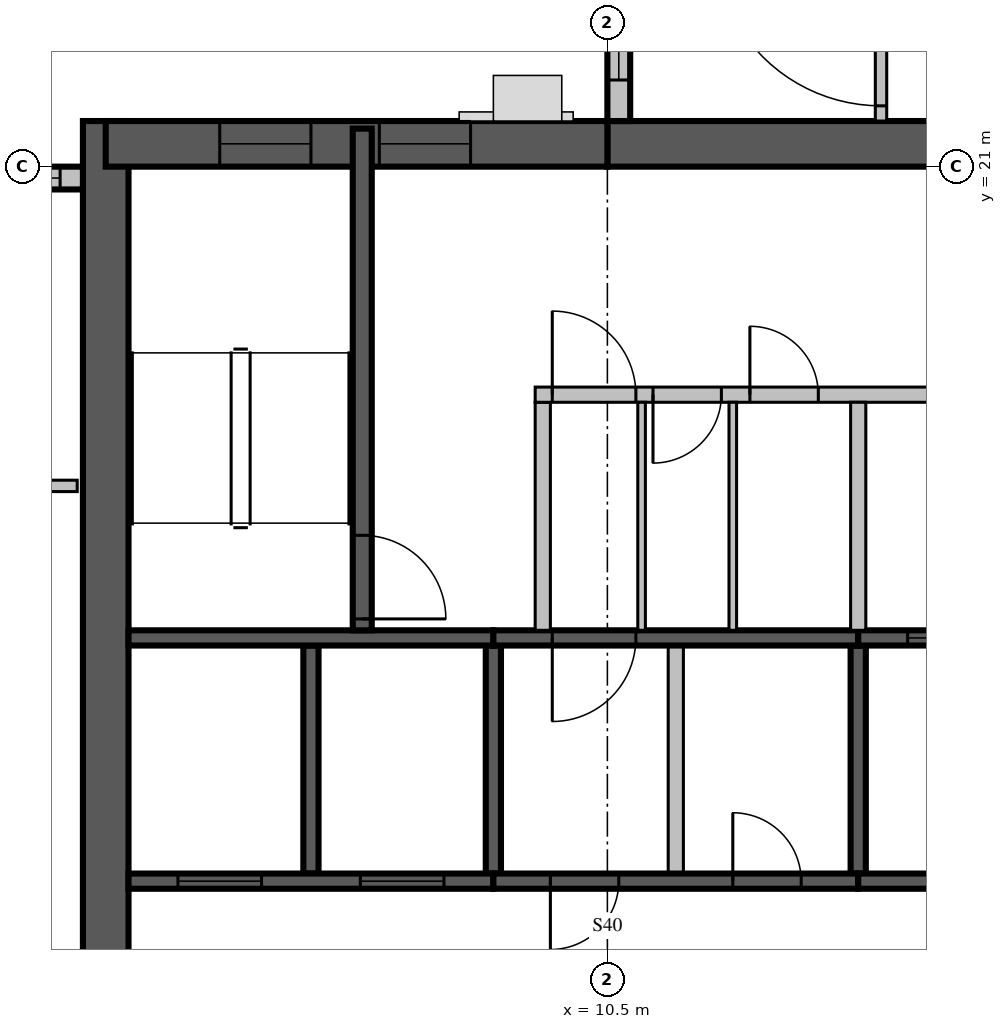
"""IFC4 building model, lengths in metres.
Left out: names, types, materials, properties, quantities, classifications, styles, units other than length and angle.
Written with IfcOpenShell. Run it as: python <this file> out.ifc"""

import sys

from ifc_helpers import new_model, si_unit, direction, frame, frame_2d, origin, place, context, subcontext, project, spatial, rectangle, extrude, source, transform, mapped, element, fill, save


model = new_model("IFC4")
c1 = context("Model", 3, precision=1e-05, world=origin(), true_north=direction((0.0, 1.0)))
c2 = subcontext(c1, "Body", "Model", "MODEL_VIEW")
j1 = project(units=[si_unit("LENGTHUNIT", "METRE"), si_unit("PLANEANGLEUNIT", "RADIAN")], contexts=[c1])
p1 = place(None, origin())
s1 = spatial("IfcSite", under=j1, at=p1, CompositionType="ELEMENT")
p2 = place(p1, origin())
s2 = spatial("IfcBuilding", under=s1, at=p2, CompositionType="ELEMENT")
p3 = place(p2, frame((0.0, 0.0, 333.5)))
s3 = spatial("IfcBuildingStorey", under=s2, at=p3, CompositionType="ELEMENT", Elevation=333.5)
m1 = source(origin(), c2, "Body", "SweptSolid", [
    extrude(rectangle(XDim=17.4, YDim=0.6, at=frame_2d((8.7, 0.0))), origin(), (0.0, 0.0, 1.0), 3.5),
])
p4 = place(p3, frame((3.9, 4.2, 0.0), z_axis=(0.0, 0.0, 1.0), x_axis=(0.0, 1.0, 0.0)))
e1 = element("IfcWall", 1, at=p4, inside=s3, PredefinedType="SHEAR", context=c2, shape_type="MappedRepresentation", body=[
    mapped(m1, transform((0.0, 0.0, 0.0), scale=1.0)),
])
m2 = source(origin(), c2, "Body", "SweptSolid", [
    extrude(rectangle(XDim=2.2, YDim=2.1, at=frame_2d((1.1, 1.05))), frame((0.0, 0.31, 0.0), z_axis=(0.0, -1.0, 0.0), x_axis=(1.0, 0.0, 0.0)), (0.0, 0.0, 1.0), 0.62),
])
p5 = place(p4, frame((4.2, 0.0, 0.0)))
e2 = element("IfcOpeningElement", 2, at=p5, cuts=e1, PredefinedType="OPENING", context=c2, shape_type="MappedRepresentation", body=[
    mapped(m2, transform((0.0, 0.0, 0.0), scale=1.0)),
])
m3 = source(origin(), c2, "Body", "SweptSolid", [
    extrude(rectangle(XDim=11.1, YDim=0.6, at=frame_2d((5.55, 0.0))), origin(), (0.0, 0.0, 1.0), 3.5),
])
p6 = place(p3, frame((10.5, 21.3, 0.0), z_axis=(0.0, 0.0, 1.0), x_axis=(1.0, 0.0, 0.0)))
e3 = element("IfcWall", 3, at=p6, inside=s3, PredefinedType="SHEAR", context=c2, shape_type="MappedRepresentation", body=[
    mapped(m3, transform((0.0, 0.0, 0.0), scale=1.0)),
])
m4 = source(origin(), c2, "Body", "SweptSolid", [
    extrude(rectangle(XDim=1.2, YDim=2.1, at=frame_2d((0.6, 1.05))), frame((0.0, 0.31, 0.0), z_axis=(0.0, -1.0, 0.0), x_axis=(1.0, 0.0, 0.0)), (0.0, 0.0, 1.0), 0.62),
])
p7 = place(p6, frame((8.7, 0.0, 0.0)))
e4 = element("IfcOpeningElement", 4, at=p7, cuts=e3, PredefinedType="OPENING", context=c2, shape_type="MappedRepresentation", body=[
    mapped(m4, transform((0.0, 0.0, 0.0), scale=1.0)),
])
m5 = source(origin(), c2, "Body", "SweptSolid", [
    extrude(rectangle(XDim=6.6, YDim=0.6, at=frame_2d((3.3, 0.0))), origin(), (0.0, 0.0, 1.0), 3.5),
])
p8 = place(p3, frame((3.9, 21.3, 0.0), z_axis=(0.0, 0.0, 1.0), x_axis=(1.0, 0.0, 0.0)))
e5 = element("IfcWall", 5, at=p8, inside=s3, PredefinedType="SHEAR", context=c2, shape_type="MappedRepresentation", body=[
    mapped(m5, transform((0.0, 0.0, 0.0), scale=1.0)),
])
m6 = source(origin(), c2, "Body", "SweptSolid", [
    extrude(rectangle(XDim=1.2, YDim=2.4, at=frame_2d((0.6, 1.2))), frame((0.0, 0.31, 0.0), z_axis=(0.0, -1.0, 0.0), x_axis=(1.0, 0.0, 0.0)), (0.0, 0.0, 1.0), 0.62),
])
p9 = place(p8, frame((1.5, 0.0, 0.6)))
e6 = element("IfcOpeningElement", 6, at=p9, cuts=e5, PredefinedType="OPENING", context=c2, shape_type="MappedRepresentation", body=[
    mapped(m6, transform((0.0, 0.0, 0.0), scale=1.0)),
])
p10 = place(p8, frame((3.6, 0.0, 0.6)))
e7 = element("IfcOpeningElement", 7, at=p10, cuts=e5, PredefinedType="OPENING", context=c2, shape_type="MappedRepresentation", body=[
    mapped(m6, transform((0.0, 0.0, 0.0), scale=1.0)),
])
m7 = source(origin(), c2, "Body", "SweptSolid", [
    extrude(rectangle(XDim=7.5, YDim=0.3, at=frame_2d((3.75, 0.0))), origin(), (0.0, 0.0, 1.0), 3.1),
])
p11 = place(p3, frame((10.65, 29.1, 0.0), z_axis=(0.0, 0.0, 1.0), x_axis=(0.0, -1.0, 0.0)))
e8 = element("IfcWall", 8, at=p11, inside=s3, PredefinedType="STANDARD", context=c2, shape_type="MappedRepresentation", body=[
    mapped(m7, transform((0.0, 0.0, 0.0), scale=1.0)),
])
m8 = source(origin(), c2, "Body", "SweptSolid", [
    extrude(rectangle(XDim=3.6, YDim=2.0, at=frame_2d((1.8, 1.0))), frame((0.0, 0.16, 0.0), z_axis=(0.0, -1.0, 0.0), x_axis=(1.0, 0.0, 0.0)), (0.0, 0.0, 1.0), 0.32),
])
p12 = place(p11, frame((3.36, 0.0, 0.6)))
e9 = element("IfcOpeningElement", 9, at=p12, cuts=e8, PredefinedType="OPENING", context=c2, shape_type="MappedRepresentation", body=[
    mapped(m8, transform((0.0, 0.0, 0.0), scale=1.0)),
])
m9 = source(origin(), c2, "Body", "SweptSolid", [
    extrude(rectangle(XDim=2.4, YDim=2.0, at=frame_2d((1.2, 1.0))), frame((0.0, 0.16, 0.0), z_axis=(0.0, -1.0, 0.0), x_axis=(1.0, 0.0, 0.0)), (0.0, 0.0, 1.0), 0.32),
])
p13 = place(p11, frame((0.48, 0.0, 0.6)))
e10 = element("IfcOpeningElement", 10, at=p13, cuts=e8, PredefinedType="OPENING", context=c2, shape_type="MappedRepresentation", body=[
    mapped(m9, transform((0.0, 0.0, 0.0), scale=1.0)),
])
m10 = source(origin(), c2, "Body", "SweptSolid", [
    extrude(rectangle(XDim=3.0, YDim=0.3, at=frame_2d((1.5, 0.0))), origin(), (0.0, 0.0, 1.0), 3.1),
])
p14 = place(p3, frame((3.6, 20.85, 0.0), z_axis=(0.0, 0.0, 1.0), x_axis=(-1.0, 0.0, 0.0)))
e11 = element("IfcWall", 11, at=p14, inside=s3, PredefinedType="STANDARD", context=c2, shape_type="MappedRepresentation", body=[
    mapped(m10, transform((0.0, 0.0, 0.0), scale=1.0)),
])
p15 = place(p14, frame((0.3, 0.0, 0.6)))
e12 = element("IfcOpeningElement", 12, at=p15, cuts=e11, PredefinedType="OPENING", context=c2, shape_type="MappedRepresentation", body=[
    mapped(m9, transform((0.0, 0.0, 0.0), scale=1.0)),
])
m11 = source(origin(), c2, "Body", "SweptSolid", [
    extrude(rectangle(XDim=3.0, YDim=0.2, at=frame_2d((1.5, 0.0))), origin(), (0.0, 0.0, 1.0), 3.5),
])
p16 = place(p3, frame((6.6, 11.7, 0.0), z_axis=(0.0, 0.0, 1.0), x_axis=(0.0, 1.0, 0.0)))
e13 = element("IfcWall", 13, at=p16, inside=s3, PredefinedType="SOLIDWALL", context=c2, shape_type="MappedRepresentation", body=[
    mapped(m11, transform((0.0, 0.0, 0.0), scale=1.0)),
])
m12 = source(origin(), c2, "Body", "SweptSolid", [
    extrude(rectangle(XDim=3.0, YDim=0.2, at=frame_2d((1.5, 0.0))), origin(), (0.0, 0.0, 1.0), 3.1),
])
for number, where, z_axis, x_axis in (
    (14, (9.0, 11.7, 0.0), (0.0, 0.0, 1.0), (0.0, 1.0, 0.0)),
    (15, (13.8, 11.7, 0.0), (0.0, 0.0, 1.0), (0.0, 1.0, 0.0)),
):
    element("IfcWall", number, at=place(p3, frame(where, z_axis=z_axis, x_axis=x_axis)), inside=s3, PredefinedType="SOLIDWALL", context=c2, shape_type="MappedRepresentation", body=[
        mapped(m12, transform((0.0, 0.0, 0.0), scale=1.0)),
    ])
m13 = source(origin(), c2, "Body", "SweptSolid", [
    extrude(rectangle(XDim=3.0, YDim=0.2, at=frame_2d((1.5, 0.0))), origin(), (0.0, 0.0, 1.0), 3.1),
])
p17 = place(p3, frame((11.4, 11.7, 0.0), z_axis=(0.0, 0.0, 1.0), x_axis=(0.0, 1.0, 0.0)))
e16 = element("IfcWall", 16, at=p17, inside=s3, PredefinedType="PARTITIONING", context=c2, shape_type="MappedRepresentation", body=[
    mapped(m13, transform((0.0, 0.0, 0.0), scale=1.0)),
])
m14 = source(origin(), c2, "Body", "SweptSolid", [
    extrude(rectangle(XDim=4.8, YDim=0.2, at=frame_2d((2.4, 0.0))), origin(), (0.0, 0.0, 1.0), 3.5),
])
p18 = place(p3, frame((4.2, 11.6, 0.0), z_axis=(0.0, 0.0, 1.0), x_axis=(1.0, 0.0, 0.0)))
e17 = element("IfcWall", 17, at=p18, inside=s3, PredefinedType="SOLIDWALL", context=c2, shape_type="MappedRepresentation", body=[
    mapped(m14, transform((0.0, 0.0, 0.0), scale=1.0)),
])
m15 = source(origin(), c2, "Body", "SweptSolid", [
    extrude(rectangle(XDim=1.1, YDim=2.1, at=frame_2d((0.55, 1.05))), frame((0.0, 0.11, 0.0), z_axis=(0.0, -1.0, 0.0), x_axis=(1.0, 0.0, 0.0)), (0.0, 0.0, 1.0), 0.22),
])
p19 = place(p18, frame((0.65, 0.0, 0.0)))
e18 = element("IfcOpeningElement", 18, at=p19, cuts=e17, PredefinedType="OPENING", context=c2, shape_type="MappedRepresentation", body=[
    mapped(m15, transform((0.0, 0.0, 0.0), scale=1.0)),
])
p20 = place(p18, frame((3.05, 0.0, 0.0)))
e19 = element("IfcOpeningElement", 19, at=p20, cuts=e17, PredefinedType="OPENING", context=c2, shape_type="MappedRepresentation", body=[
    mapped(m15, transform((0.0, 0.0, 0.0), scale=1.0)),
])
m16 = source(origin(), c2, "Body", "SweptSolid", [
    extrude(rectangle(XDim=4.8, YDim=0.2, at=frame_2d((2.4, 0.0))), origin(), (0.0, 0.0, 1.0), 3.1),
])
p21 = place(p3, frame((9.0, 11.6, 0.0), z_axis=(0.0, 0.0, 1.0), x_axis=(1.0, 0.0, 0.0)))
e20 = element("IfcWall", 20, at=p21, inside=s3, PredefinedType="SOLIDWALL", context=c2, shape_type="MappedRepresentation", body=[
    mapped(m16, transform((0.0, 0.0, 0.0), scale=1.0)),
])
m17 = source(origin(), c2, "Body", "SweptSolid", [
    extrude(rectangle(XDim=0.9, YDim=2.1, at=frame_2d((0.45, 1.05))), frame((0.0, 0.11, 0.0), z_axis=(0.0, -1.0, 0.0), x_axis=(1.0, 0.0, 0.0)), (0.0, 0.0, 1.0), 0.22),
])
p22 = place(p21, frame((0.75, 0.0, 0.0)))
e21 = element("IfcOpeningElement", 21, at=p22, cuts=e20, PredefinedType="OPENING", context=c2, shape_type="MappedRepresentation", body=[
    mapped(m17, transform((0.0, 0.0, 0.0), scale=1.0)),
])
p23 = place(p21, frame((3.15, 0.0, 0.0)))
e22 = element("IfcOpeningElement", 22, at=p23, cuts=e20, PredefinedType="OPENING", context=c2, shape_type="MappedRepresentation", body=[
    mapped(m17, transform((0.0, 0.0, 0.0), scale=1.0)),
])
m18 = source(origin(), c2, "Body", "SweptSolid", [
    extrude(rectangle(XDim=7.2, YDim=0.2, at=frame_2d((3.6, 0.0))), origin(), (0.0, 0.0, 1.0), 3.5),
])
p24 = place(p3, frame((13.8, 11.6, 0.0), z_axis=(0.0, 0.0, 1.0), x_axis=(1.0, 0.0, 0.0)))
e23 = element("IfcWall", 23, at=p24, inside=s3, PredefinedType="SOLIDWALL", context=c2, shape_type="MappedRepresentation", body=[
    mapped(m18, transform((0.0, 0.0, 0.0), scale=1.0)),
])
p25 = place(p3, frame((4.2, 14.8, 0.0), z_axis=(0.0, 0.0, 1.0), x_axis=(1.0, 0.0, 0.0)))
e24 = element("IfcWall", 24, at=p25, inside=s3, PredefinedType="SOLIDWALL", context=c2, shape_type="MappedRepresentation", body=[
    mapped(m14, transform((0.0, 0.0, 0.0), scale=1.0)),
])
p26 = place(p3, frame((9.0, 14.8, 0.0), z_axis=(0.0, 0.0, 1.0), x_axis=(1.0, 0.0, 0.0)))
e25 = element("IfcWall", 25, at=p26, inside=s3, PredefinedType="SOLIDWALL", context=c2, shape_type="MappedRepresentation", body=[
    mapped(m16, transform((0.0, 0.0, 0.0), scale=1.0)),
])
p27 = place(p26, frame((0.775, 0.0, 0.0)))
e26 = element("IfcOpeningElement", 26, at=p27, cuts=e25, PredefinedType="OPENING", context=c2, shape_type="MappedRepresentation", body=[
    mapped(m15, transform((0.0, 0.0, 0.0), scale=1.0)),
])
p28 = place(p3, frame((13.8, 14.8, 0.0), z_axis=(0.0, 0.0, 1.0), x_axis=(1.0, 0.0, 0.0)))
e27 = element("IfcWall", 27, at=p28, inside=s3, PredefinedType="SOLIDWALL", context=c2, shape_type="MappedRepresentation", body=[
    mapped(m18, transform((0.0, 0.0, 0.0), scale=1.0)),
])
p29 = place(p28, frame((0.65, 0.0, 0.0)))
e28 = element("IfcOpeningElement", 28, at=p29, cuts=e27, PredefinedType="OPENING", context=c2, shape_type="MappedRepresentation", body=[
    mapped(m15, transform((0.0, 0.0, 0.0), scale=1.0)),
])
p30 = place(p28, frame((3.05, 0.0, 0.0)))
e29 = element("IfcOpeningElement", 29, at=p30, cuts=e27, PredefinedType="OPENING", context=c2, shape_type="MappedRepresentation", body=[
    mapped(m15, transform((0.0, 0.0, 0.0), scale=1.0)),
])
p31 = place(p28, frame((5.45, 0.0, 0.0)))
e30 = element("IfcOpeningElement", 30, at=p31, cuts=e27, PredefinedType="OPENING", context=c2, shape_type="MappedRepresentation", body=[
    mapped(m15, transform((0.0, 0.0, 0.0), scale=1.0)),
])
m19 = source(origin(), c2, "Body", "SweptSolid", [
    extrude(rectangle(XDim=6.6, YDim=0.25, at=frame_2d((3.3, 0.0))), origin(), (0.0, 0.0, 1.0), 3.1),
])
p32 = place(p3, frame((7.275, 14.9, 0.0), z_axis=(0.0, 0.0, 1.0), x_axis=(0.0, 1.0, 0.0)))
e31 = element("IfcWall", 31, at=p32, inside=s3, PredefinedType="SOLIDWALL", context=c2, shape_type="MappedRepresentation", body=[
    mapped(m19, transform((0.0, 0.0, 0.0), scale=1.0)),
])
m20 = source(origin(), c2, "Body", "SweptSolid", [
    extrude(rectangle(XDim=1.1, YDim=2.1, at=frame_2d((0.55, 1.05))), frame((0.0, 0.135, 0.0), z_axis=(0.0, -1.0, 0.0), x_axis=(1.0, 0.0, 0.0)), (0.0, 0.0, 1.0), 0.27),
])
p33 = place(p32, frame((0.15, 0.0, 0.0)))
e32 = element("IfcOpeningElement", 32, at=p33, cuts=e31, PredefinedType="OPENING", context=c2, shape_type="MappedRepresentation", body=[
    mapped(m20, transform((0.0, 0.0, 0.0), scale=1.0)),
])
p34 = place(p3, frame((9.65, 14.9, 0.0), z_axis=(0.0, 0.0, 1.0), x_axis=(0.0, 1.0, 0.0)))
e33 = element("IfcWall", 33, at=p34, inside=s3, PredefinedType="PARTITIONING", context=c2, shape_type="MappedRepresentation", body=[
    mapped(m13, transform((0.0, 0.0, 0.0), scale=1.0)),
])
m21 = source(origin(), c2, "Body", "SweptSolid", [
    extrude(rectangle(XDim=11.45, YDim=0.2, at=frame_2d((5.725, 0.0))), origin(), (0.0, 0.0, 1.0), 3.1),
])
p35 = place(p3, frame((9.55, 18.0, 0.0), z_axis=(0.0, 0.0, 1.0), x_axis=(1.0, 0.0, 0.0)))
e34 = element("IfcWall", 34, at=p35, inside=s3, PredefinedType="PARTITIONING", context=c2, shape_type="MappedRepresentation", body=[
    mapped(m21, transform((0.0, 0.0, 0.0), scale=1.0)),
])
p36 = place(p35, frame((0.225, 0.0, 0.0)))
e35 = element("IfcOpeningElement", 35, at=p36, cuts=e34, PredefinedType="OPENING", context=c2, shape_type="MappedRepresentation", body=[
    mapped(m15, transform((0.0, 0.0, 0.0), scale=1.0)),
])
p37 = place(p35, frame((1.55, 0.0, 0.0)))
e36 = element("IfcOpeningElement", 36, at=p37, cuts=e34, PredefinedType="OPENING", context=c2, shape_type="MappedRepresentation", body=[
    mapped(m17, transform((0.0, 0.0, 0.0), scale=1.0)),
])
p38 = place(p35, frame((2.825, 0.0, 0.0)))
e37 = element("IfcOpeningElement", 37, at=p38, cuts=e34, PredefinedType="OPENING", context=c2, shape_type="MappedRepresentation", body=[
    mapped(m17, transform((0.0, 0.0, 0.0), scale=1.0)),
])
p39 = place(p35, frame((7.35, 0.0, 0.0)))
e38 = element("IfcOpeningElement", 38, at=p39, cuts=e34, PredefinedType="OPENING", context=c2, shape_type="MappedRepresentation", body=[
    mapped(m15, transform((0.0, 0.0, 0.0), scale=1.0)),
])
p40 = place(p3, frame((13.8, 14.9, 0.0), z_axis=(0.0, 0.0, 1.0), x_axis=(0.0, 1.0, 0.0)))
e39 = element("IfcWall", 39, at=p40, inside=s3, PredefinedType="PARTITIONING", context=c2, shape_type="MappedRepresentation", body=[
    mapped(m13, transform((0.0, 0.0, 0.0), scale=1.0)),
])
m22 = source(origin(), c2, "Body", "SweptSolid", [
    extrude(rectangle(XDim=3.0, YDim=0.1, at=frame_2d((1.5, 0.0))), origin(), (0.0, 0.0, 1.0), 3.1),
])
for number, where, z_axis, x_axis in (
    (40, (10.95, 14.9, 0.0), (0.0, 0.0, 1.0), (0.0, 1.0, 0.0)),
    (41, (12.15, 14.9, 0.0), (0.0, 0.0, 1.0), (0.0, 1.0, 0.0)),
):
    element("IfcWall", number, at=place(p3, frame(where, z_axis=z_axis, x_axis=x_axis)), inside=s3, PredefinedType="PARTITIONING", context=c2, shape_type="MappedRepresentation", body=[
        mapped(m22, transform((0.0, 0.0, 0.0), scale=1.0)),
    ])
m23 = source(origin(), c2, "Body", "SweptSolid", [
    extrude(rectangle(XDim=3.225, YDim=0.15, at=frame_2d((1.613, 0.0))), origin(), (0.0, 0.0, 1.0), 3.1),
])
p41 = place(p3, frame((0.3, 16.8, 0.0), z_axis=(0.0, 0.0, 1.0), x_axis=(1.0, 0.0, 0.0)))
e42 = element("IfcWall", 42, at=p41, inside=s3, PredefinedType="PARTITIONING", context=c2, shape_type="MappedRepresentation", body=[
    mapped(m23, transform((0.0, 0.0, 0.0), scale=1.0)),
])
m24 = source(origin(), c2, "Body", "SweptSolid", [
    extrude(rectangle(XDim=0.9, YDim=2.1, at=frame_2d((0.45, 1.05))), frame((0.0, 0.085, 0.0), z_axis=(0.0, -1.0, 0.0), x_axis=(1.0, 0.0, 0.0)), (0.0, 0.0, 1.0), 0.17),
])
p42 = place(p41, frame((1.2, 0.0, 0.0)))
e43 = element("IfcOpeningElement", 43, at=p42, cuts=e42, PredefinedType="OPENING", context=c2, shape_type="MappedRepresentation", body=[
    mapped(m24, transform((0.0, 0.0, 0.0), scale=1.0)),
])
m25 = source(origin(), c2, "Body", "SweptSolid", [
    extrude(rectangle(XDim=7.725, YDim=0.15, at=frame_2d((3.862, 0.0))), origin(), (0.0, 0.0, 1.0), 3.1),
])
p43 = place(p3, frame((14.1, 29.325, 0.0), z_axis=(0.0, 0.0, 1.0), x_axis=(0.0, -1.0, 0.0)))
e44 = element("IfcWall", 44, at=p43, inside=s3, PredefinedType="PARTITIONING", context=c2, shape_type="MappedRepresentation", body=[
    mapped(m25, transform((0.0, 0.0, 0.0), scale=1.0)),
])
m26 = source(origin(), c2, "Body", "SweptSolid", [
    extrude(rectangle(XDim=2.2, YDim=2.1, at=frame_2d((1.1, 1.05))), frame((0.0, 0.085, 0.0), z_axis=(0.0, -1.0, 0.0), x_axis=(1.0, 0.0, 0.0)), (0.0, 0.0, 1.0), 0.17),
])
p44 = place(p43, frame((5.325, 0.0, 0.0)))
e45 = element("IfcOpeningElement", 45, at=p44, cuts=e44, PredefinedType="OPENING", context=c2, shape_type="MappedRepresentation", body=[
    mapped(m26, transform((0.0, 0.0, 0.0), scale=1.0)),
])
m27 = source(origin(), c2, "Body", "SweptSolid", [
    extrude(rectangle(XDim=3.6, YDim=2.0, at=frame_2d((1.8, 1.0))), frame((0.0, 0.03, 0.0), z_axis=(0.0, -1.0, 0.0), x_axis=(1.0, 0.0, 0.0)), (0.0, 0.0, 1.0), 0.06),
])
p45 = place(p12, origin())
e46 = element("IfcWindow", 46, at=p45, inside=s3, PartitioningType="SINGLE_PANEL", PredefinedType="WINDOW", context=c2, shape_type="MappedRepresentation", body=[
    mapped(m27, transform((0.0, 0.0, 0.0), scale=1.0)),
])
fill(e9, e46)
m28 = source(origin(), c2, "Body", "SweptSolid", [
    extrude(rectangle(XDim=2.4, YDim=2.0, at=frame_2d((1.2, 1.0))), frame((0.0, 0.03, 0.0), z_axis=(0.0, -1.0, 0.0), x_axis=(1.0, 0.0, 0.0)), (0.0, 0.0, 1.0), 0.06),
])
p46 = place(p15, origin())
e47 = element("IfcWindow", 47, at=p46, inside=s3, PartitioningType="SINGLE_PANEL", PredefinedType="WINDOW", context=c2, shape_type="MappedRepresentation", body=[
    mapped(m28, transform((0.0, 0.0, 0.0), scale=1.0)),
])
fill(e12, e47)
m29 = source(origin(), c2, "Body", "SweptSolid", [
    extrude(rectangle(XDim=1.1, YDim=2.1, at=frame_2d((0.55, 1.05))), frame((0.0, 0.025, 0.0), z_axis=(0.0, -1.0, 0.0), x_axis=(1.0, 0.0, 0.0)), (0.0, 0.0, 1.0), 0.05),
])
p47 = place(p19, origin())
e48 = element("IfcDoor", 48, at=p47, inside=s3, OperationType="SLIDING_TO_LEFT", PredefinedType="DOOR", context=c2, shape_type="MappedRepresentation", body=[
    mapped(m29, transform((0.0, 0.0, 0.0), scale=1.0)),
])
fill(e18, e48)
p48 = place(p20, origin())
e49 = element("IfcDoor", 49, at=p48, inside=s3, OperationType="SLIDING_TO_LEFT", PredefinedType="DOOR", context=c2, shape_type="MappedRepresentation", body=[
    mapped(m29, transform((0.0, 0.0, 0.0), scale=1.0)),
])
fill(e19, e49)
m30 = source(origin(), c2, "Body", "SweptSolid", [
    extrude(rectangle(XDim=0.9, YDim=2.1, at=frame_2d((0.45, 1.05))), frame((0.0, 0.025, 0.0), z_axis=(0.0, -1.0, 0.0), x_axis=(1.0, 0.0, 0.0)), (0.0, 0.0, 1.0), 0.05),
])
p49 = place(p22, origin())
e50 = element("IfcDoor", 50, at=p49, inside=s3, OperationType="SINGLE_SWING_RIGHT", PredefinedType="DOOR", context=c2, shape_type="MappedRepresentation", body=[
    mapped(m30, transform((0.0, 0.0, 0.0), scale=1.0)),
])
fill(e21, e50)
p50 = place(p23, origin())
e51 = element("IfcDoor", 51, at=p50, inside=s3, OperationType="SINGLE_SWING_LEFT", PredefinedType="DOOR", context=c2, shape_type="MappedRepresentation", body=[
    mapped(m30, transform((0.0, 0.0, 0.0), scale=1.0)),
])
fill(e22, e51)
p51 = place(p27, origin())
e52 = element("IfcDoor", 52, at=p51, inside=s3, OperationType="SINGLE_SWING_RIGHT", PredefinedType="DOOR", context=c2, shape_type="MappedRepresentation", body=[
    mapped(m29, transform((0.0, 0.0, 0.0), scale=1.0)),
])
fill(e26, e52)
p52 = place(p29, origin())
e53 = element("IfcDoor", 53, at=p52, inside=s3, OperationType="SLIDING_TO_LEFT", PredefinedType="DOOR", context=c2, shape_type="MappedRepresentation", body=[
    mapped(m29, transform((0.0, 0.0, 0.0), scale=1.0)),
])
fill(e28, e53)
p53 = place(p33, origin())
e54 = element("IfcDoor", 54, at=p53, inside=s3, OperationType="SINGLE_SWING_RIGHT", PredefinedType="DOOR", context=c2, shape_type="MappedRepresentation", body=[
    mapped(m29, transform((0.0, 0.0, 0.0), scale=1.0)),
])
fill(e32, e54)
p54 = place(p36, origin())
e55 = element("IfcDoor", 55, at=p54, inside=s3, OperationType="SINGLE_SWING_LEFT", PredefinedType="DOOR", context=c2, shape_type="MappedRepresentation", body=[
    mapped(m29, transform((0.0, 0.0, 0.0), scale=1.0)),
])
fill(e35, e55)
p55 = place(p37, origin())
e56 = element("IfcDoor", 56, at=p55, inside=s3, OperationType="SINGLE_SWING_RIGHT", PredefinedType="DOOR", context=c2, shape_type="MappedRepresentation", body=[
    mapped(m30, transform((0.0, 0.0, 0.0), scale=1.0)),
])
fill(e36, e56)
p56 = place(p38, origin())
e57 = element("IfcDoor", 57, at=p56, inside=s3, OperationType="SINGLE_SWING_LEFT", PredefinedType="DOOR", context=c2, shape_type="MappedRepresentation", body=[
    mapped(m30, transform((0.0, 0.0, 0.0), scale=1.0)),
])
fill(e37, e57)
m31 = source(origin(), c2, "Body", "SweptSolid", [
    extrude(rectangle(XDim=1.2, YDim=2.4, at=frame_2d((0.6, 1.2))), frame((0.0, 0.03, 0.0), z_axis=(0.0, -1.0, 0.0), x_axis=(1.0, 0.0, 0.0)), (0.0, 0.0, 1.0), 0.06),
])
p57 = place(p9, origin())
e58 = element("IfcWindow", 58, at=p57, inside=s3, PartitioningType="SINGLE_PANEL", PredefinedType="WINDOW", context=c2, shape_type="MappedRepresentation", body=[
    mapped(m31, transform((0.0, 0.0, 0.0), scale=1.0)),
])
fill(e6, e58)
p58 = place(p10, origin())
e59 = element("IfcWindow", 59, at=p58, inside=s3, PartitioningType="SINGLE_PANEL", PredefinedType="WINDOW", context=c2, shape_type="MappedRepresentation", body=[
    mapped(m31, transform((0.0, 0.0, 0.0), scale=1.0)),
])
fill(e7, e59)
m32 = source(origin(), c2, "Body", "SweptSolid", [
    extrude(rectangle(XDim=2.2, YDim=2.1, at=frame_2d((1.1, 1.05))), frame((0.0, 0.025, 0.0), z_axis=(0.0, -1.0, 0.0), x_axis=(1.0, 0.0, 0.0)), (0.0, 0.0, 1.0), 0.05),
])
p59 = place(p44, origin())
e60 = element("IfcDoor", 60, at=p59, inside=s3, OperationType="DOUBLE_DOOR_SINGLE_SWING", PredefinedType="DOOR", context=c2, shape_type="MappedRepresentation", body=[
    mapped(m32, transform((0.0, 0.0, 0.0), scale=1.0)),
])
fill(e45, e60)
save(model, sys.argv[1])
